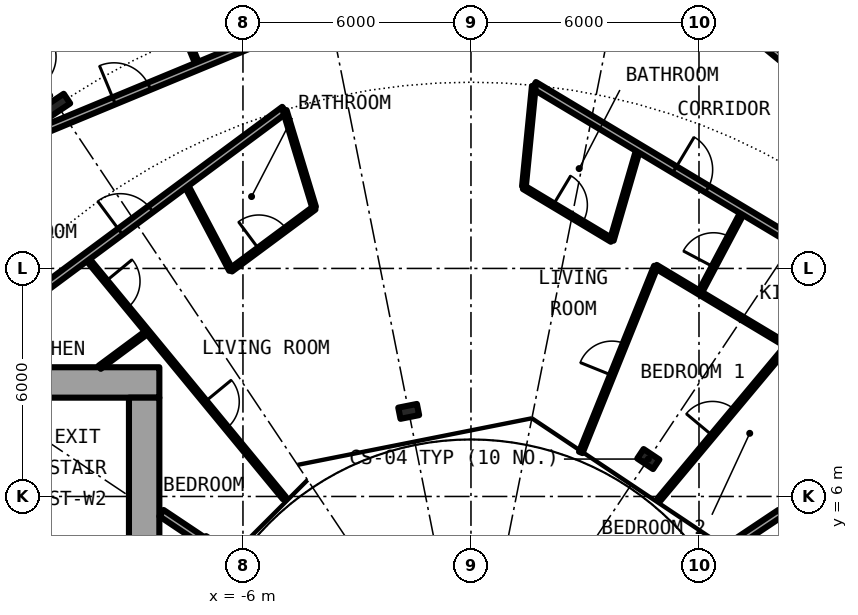
"""IFC4 building model, lengths in metres.
Left out: names, types, materials, properties, quantities, classifications, styles, units other than length and angle.
Written with IfcOpenShell. Run it as: python <this file> out.ifc"""

import sys

from ifc_helpers import new_model, si_unit, direction, frame, frame_2d, origin, origin_2d, place, context, subcontext, project, spatial, rectangle, i_section, extrude, element, fill, save


model = new_model("IFC4")
c1 = context("Model", 3, precision=1e-05, world=origin(), true_north=direction((0.0, 1.0)))
c2 = subcontext(c1, "Body", "Model", "MODEL_VIEW")
j1 = project(units=[si_unit("LENGTHUNIT", "METRE"), si_unit("PLANEANGLEUNIT", "RADIAN")], contexts=[c1])
p1 = place(None, origin())
s1 = spatial("IfcSite", under=j1, at=p1, CompositionType="ELEMENT")
p2 = place(p1, origin())
s2 = spatial("IfcBuilding", under=s1, at=p2, CompositionType="ELEMENT")
p3 = place(p2, frame((0.0, 0.0, 50.25)))
s3 = spatial("IfcBuildingStorey", under=s2, at=p3, CompositionType="ELEMENT", Elevation=50.25)
p4 = place(p3, frame((-10.889, 16.297, 0.0), z_axis=(0.0, 0.0, 1.0), x_axis=(-0.55557023302, 0.831469612303, 0.0)))
e1 = element("IfcColumn", 1, at=p4, inside=s3, PredefinedType="COLUMN", context=c2, shape_type="SweptSolid", body=[
    extrude(i_section(OverallWidth=0.305, OverallDepth=0.62, WebThickness=0.021, FlangeThickness=0.04, FilletRadius=0.027, at=origin_2d()), origin(), (0.0, 0.0, 1.0), 3.05),
])
for number, where, z_axis, x_axis in (
    (2, (4.667, 6.984, 0.0), (0.0, 0.0, 1.0), (0.556, 0.831, 0.0)),
    (3, (-1.639, 8.239, 0.0), (0.0, 0.0, 1.0), (-0.195, 0.981, 0.0)),
):
    element("IfcColumn", number, at=place(p3, frame(where, z_axis=z_axis, x_axis=x_axis)), inside=s3, PredefinedType="COLUMN", context=c2, shape_type="SweptSolid", body=[
        extrude(i_section(OverallWidth=0.3, OverallDepth=0.5, WebThickness=0.014, FlangeThickness=0.028, FilletRadius=0.027, at=origin_2d()), origin(), (0.0, 0.0, 1.0), 3.05),
    ])
p5 = place(p3, frame((-8.2, 9.0, 0.0), z_axis=(0.0, 0.0, 1.0), x_axis=(-1.0, 0.0, 0.0)))
e4 = element("IfcWall", 4, at=p5, inside=s3, PredefinedType="SHEAR", context=c2, shape_type="SweptSolid", body=[
    extrude(rectangle(XDim=14.2, YDim=0.8, at=frame_2d((7.1, 0.0))), origin(), (0.0, 0.0, 1.0), 3.05),
])
p6 = place(p5, frame((11.675, 0.0, 0.0)))
e5 = element("IfcOpeningElement", 5, at=p6, cuts=e4, PredefinedType="OPENING", context=c2, shape_type="SweptSolid", body=[
    extrude(rectangle(XDim=1.2, YDim=2.3, at=frame_2d((0.6, 1.15))), frame((0.0, 0.41, 0.0), z_axis=(0.0, -1.0, 0.0), x_axis=(1.0, 0.0, 0.0)), (0.0, 0.0, 1.0), 0.82),
])
p7 = place(p3, frame((-8.6, 8.6, 0.0), z_axis=(0.0, 0.0, 1.0), x_axis=(0.0, -1.0, 0.0)))
e6 = element("IfcWall", 6, at=p7, inside=s3, PredefinedType="SHEAR", context=c2, shape_type="SweptSolid", body=[
    extrude(rectangle(XDim=17.2, YDim=0.8, at=frame_2d((8.6, 0.0))), origin(), (0.0, 0.0, 1.0), 3.05),
])
p8 = place(p7, frame((7.4, 0.0, 0.1)))
e7 = element("IfcOpeningElement", 7, at=p8, cuts=e6, PredefinedType="OPENING", context=c2, shape_type="SweptSolid", body=[
    extrude(rectangle(XDim=2.4, YDim=2.2, at=frame_2d((1.2, 1.1))), frame((0.0, 0.41, 0.0), z_axis=(0.0, -1.0, 0.0), x_axis=(1.0, 0.0, 0.0)), (0.0, 0.0, 1.0), 0.82),
])
p9 = place(p3, frame((-10.398, 25.107, 0.0), z_axis=(0.0, 0.0, 1.0), x_axis=(0.382458509789, -0.923972666419, 0.0)))
e8 = element("IfcWall", 8, at=p9, inside=s3, PredefinedType="PARTITIONING", context=c2, shape_type="SweptSolid", body=[
    extrude(rectangle(XDim=8.419, YDim=0.1, at=frame_2d((4.209, 0.0))), origin(), (0.0, 0.0, 1.0), 2.7),
])
p10 = place(p9, frame((6.677, 0.0, 0.0)))
e9 = element("IfcOpeningElement", 9, at=p10, cuts=e8, PredefinedType="OPENING", context=c2, shape_type="SweptSolid", body=[
    extrude(rectangle(XDim=0.9, YDim=2.3, at=frame_2d((0.45, 1.15))), frame((0.0, 0.06, 0.0), z_axis=(0.0, -1.0, 0.0), x_axis=(1.0, 0.0, 0.0)), (0.0, 0.0, 1.0), 0.12),
])
p11 = place(p9, frame((2.468, 0.0, 0.0)))
e10 = element("IfcOpeningElement", 10, at=p11, cuts=e8, PredefinedType="OPENING", context=c2, shape_type="SweptSolid", body=[
    extrude(rectangle(XDim=0.9, YDim=2.3, at=frame_2d((0.45, 1.15))), frame((0.0, 0.06, 0.0), z_axis=(0.0, -1.0, 0.0), x_axis=(1.0, 0.0, 0.0)), (0.0, 0.0, 1.0), 0.12),
])
p12 = place(p3, frame((-10.132, 12.296, 0.0), z_axis=(0.0, 0.0, 1.0), x_axis=(0.635976043025, -0.771708800454, 0.0)))
e11 = element("IfcWall", 11, at=p12, inside=s3, PredefinedType="PARTITIONING", context=c2, shape_type="SweptSolid", body=[
    extrude(rectangle(XDim=8.213, YDim=0.1, at=frame_2d((4.106, 0.0))), origin(), (0.0, 0.0, 1.0), 2.7),
])
p13 = place(p12, frame((0.823, 0.0, 0.0)))
e12 = element("IfcOpeningElement", 12, at=p13, cuts=e11, PredefinedType="OPENING", context=c2, shape_type="SweptSolid", body=[
    extrude(rectangle(XDim=0.9, YDim=2.3, at=frame_2d((0.45, 1.15))), frame((0.0, 0.06, 0.0), z_axis=(0.0, -1.0, 0.0), x_axis=(1.0, 0.0, 0.0)), (0.0, 0.0, 1.0), 0.12),
])
p14 = place(p12, frame((4.929, 0.0, 0.0)))
e13 = element("IfcOpeningElement", 13, at=p14, cuts=e11, PredefinedType="OPENING", context=c2, shape_type="SweptSolid", body=[
    extrude(rectangle(XDim=0.9, YDim=2.3, at=frame_2d((0.45, 1.15))), frame((0.0, 0.06, 0.0), z_axis=(0.0, -1.0, 0.0), x_axis=(1.0, 0.0, 0.0)), (0.0, 0.0, 1.0), 0.12),
])
p15 = place(p3, frame((-7.519, 14.234, 0.0), z_axis=(0.0, 0.0, 1.0), x_axis=(0.467001992543, -0.884256263173, 0.0)))
e14 = element("IfcWall", 14, at=p15, inside=s3, PredefinedType="PARTITIONING", context=c2, shape_type="SweptSolid", body=[
    extrude(rectangle(XDim=2.572, YDim=0.1, at=frame_2d((1.286, 0.0))), origin(), (0.0, 0.0, 1.0), 2.7),
])
p16 = place(p3, frame((2.889, 7.159, 0.0), z_axis=(0.0, 0.0, 1.0), x_axis=(0.374372761824, 0.927278294367, 0.0)))
e15 = element("IfcWall", 15, at=p16, inside=s3, PredefinedType="PARTITIONING", context=c2, shape_type="SweptSolid", body=[
    extrude(rectangle(XDim=5.276, YDim=0.1, at=frame_2d((2.638, 0.0))), origin(), (0.0, 0.0, 1.0), 2.7),
])
p17 = place(p16, frame((2.188, 0.0, 0.0)))
e16 = element("IfcOpeningElement", 16, at=p17, cuts=e15, PredefinedType="OPENING", context=c2, shape_type="SweptSolid", body=[
    extrude(rectangle(XDim=0.9, YDim=2.3, at=frame_2d((0.45, 1.15))), frame((0.0, 0.06, 0.0), z_axis=(0.0, -1.0, 0.0), x_axis=(1.0, 0.0, 0.0)), (0.0, 0.0, 1.0), 0.12),
])
p18 = place(p3, frame((3.706, 12.744, 0.0), z_axis=(0.0, 0.0, 1.0), x_axis=(0.279201466266, 0.960232545395, 0.0)))
e17 = element("IfcWall", 17, at=p18, inside=s3, PredefinedType="PARTITIONING", context=c2, shape_type="SweptSolid", body=[
    extrude(rectangle(XDim=2.524, YDim=0.1, at=frame_2d((1.262, 0.0))), origin(), (0.0, 0.0, 1.0), 2.7),
])
p19 = place(p3, frame((4.952, 5.923, 0.0), z_axis=(0.0, 0.0, 1.0), x_axis=(0.641376424834, 0.767226356213, 0.0)))
e18 = element("IfcWall", 18, at=p19, inside=s3, PredefinedType="PARTITIONING", context=c2, shape_type="SweptSolid", body=[
    extrude(rectangle(XDim=5.275, YDim=0.1, at=frame_2d((2.637, 0.0))), origin(), (0.0, 0.0, 1.0), 2.7),
])
p20 = place(p19, frame((2.187, 0.0, 0.0)))
e19 = element("IfcOpeningElement", 19, at=p20, cuts=e18, PredefinedType="OPENING", context=c2, shape_type="SweptSolid", body=[
    extrude(rectangle(XDim=0.9, YDim=2.3, at=frame_2d((0.45, 1.15))), frame((0.0, 0.06, 0.0), z_axis=(0.0, -1.0, 0.0), x_axis=(1.0, 0.0, 0.0)), (0.0, 0.0, 1.0), 0.12),
])
p21 = place(p3, frame((6.021, 11.357, 0.0), z_axis=(0.0, 0.0, 1.0), x_axis=(0.468337293896, 0.883549760425, 0.0)))
e20 = element("IfcWall", 20, at=p21, inside=s3, PredefinedType="PARTITIONING", context=c2, shape_type="SweptSolid", body=[
    extrude(rectangle(XDim=2.445, YDim=0.1, at=frame_2d((1.222, 0.0))), origin(), (0.0, 0.0, 1.0), 2.7),
])
p22 = place(p21, frame((0.772, 0.0, 0.0)))
e21 = element("IfcOpeningElement", 21, at=p22, cuts=e20, PredefinedType="OPENING", context=c2, shape_type="SweptSolid", body=[
    extrude(rectangle(XDim=0.9, YDim=2.3, at=frame_2d((0.45, 1.15))), frame((0.0, 0.06, 0.0), z_axis=(0.0, -1.0, 0.0), x_axis=(1.0, 0.0, 0.0)), (0.0, 0.0, 1.0), 0.12),
])
for number, where, z_axis, x_axis in (
    (22, (-6.513, 4.472, 0.0), (0.0, 0.0, 1.0), (-0.831, 0.556, 0.0)),
    (23, (6.513, 4.472, 0.0), (0.0, 0.0, 1.0), (0.831, 0.556, 0.0)),
):
    element("IfcWall", number, at=place(p3, frame(where, z_axis=z_axis, x_axis=x_axis)), inside=s3, PredefinedType="PARTITIONING", context=c2, shape_type="SweptSolid", body=[
        extrude(rectangle(XDim=1.962, YDim=0.2, at=frame_2d((0.981, 0.0))), origin(), (0.0, 0.0, 1.0), 2.7),
    ])
p23 = place(p3, frame((1.392, 14.132, 0.0), z_axis=(0.0, 0.0, 1.0), x_axis=(0.857524856518, -0.514442533674, 0.0)))
e24 = element("IfcWall", 24, at=p23, inside=s3, PredefinedType="PARTITIONING", context=c2, shape_type="SweptSolid", body=[
    extrude(rectangle(XDim=2.698, YDim=0.1, at=frame_2d((1.349, 0.0))), origin(), (0.0, 0.0, 1.0), 2.7),
])
p24 = place(p23, frame((0.899, 0.0, 0.0)))
e25 = element("IfcOpeningElement", 25, at=p24, cuts=e24, PredefinedType="OPENING", context=c2, shape_type="SweptSolid", body=[
    extrude(rectangle(XDim=0.9, YDim=2.3, at=frame_2d((0.45, 1.15))), frame((0.0, 0.06, 0.0), z_axis=(0.0, -1.0, 0.0), x_axis=(1.0, 0.0, 0.0)), (0.0, 0.0, 1.0), 0.12),
])
p25 = place(p3, frame((4.863, 12.05, 0.0), z_axis=(0.0, 0.0, 1.0), x_axis=(0.857576410704, -0.51435658818, 0.0)))
e26 = element("IfcWall", 26, at=p25, inside=s3, PredefinedType="PARTITIONING", context=c2, shape_type="SweptSolid", body=[
    extrude(rectangle(XDim=5.16, YDim=0.1, at=frame_2d((2.58, 0.0))), origin(), (0.0, 0.0, 1.0), 2.7),
])
p26 = place(p3, frame((-9.772, 9.398, 0.0), z_axis=(0.0, 0.0, 1.0), x_axis=(0.803264156882, 0.595622946392, 0.0)))
e27 = element("IfcWall", 27, at=p26, inside=s3, PredefinedType="PARTITIONING", context=c2, shape_type="SweptSolid", body=[
    extrude(rectangle(XDim=1.565, YDim=0.1, at=frame_2d((0.782, 0.0))), origin(), (0.0, 0.0, 1.0), 2.7),
])
p27 = place(p3, frame((-6.318, 11.96, 0.0), z_axis=(0.0, 0.0, 1.0), x_axis=(0.803128348509, 0.595806055542, 0.0)))
e28 = element("IfcWall", 28, at=p27, inside=s3, PredefinedType="PARTITIONING", context=c2, shape_type="SweptSolid", body=[
    extrude(rectangle(XDim=2.734, YDim=0.1, at=frame_2d((1.367, 0.0))), origin(), (0.0, 0.0, 1.0), 2.7),
])
p28 = place(p27, frame((0.917, 0.0, 0.0)))
e29 = element("IfcOpeningElement", 29, at=p28, cuts=e28, PredefinedType="OPENING", context=c2, shape_type="SweptSolid", body=[
    extrude(rectangle(XDim=0.9, YDim=2.3, at=frame_2d((0.45, 1.15))), frame((0.0, 0.06, 0.0), z_axis=(0.0, -1.0, 0.0), x_axis=(1.0, 0.0, 0.0)), (0.0, 0.0, 1.0), 0.12),
])
p29 = place(p3, frame((1.658, 16.819, 0.0), z_axis=(0.0, 0.0, 1.0), x_axis=(0.857688434449, -0.514169767113, 0.0)))
e30 = element("IfcWall", 30, at=p29, inside=s3, PredefinedType="PARTITIONING", context=c2, shape_type="SweptSolid", body=[
    extrude(rectangle(XDim=14.429, YDim=0.2, at=frame_2d((7.215, 0.0))), origin(), (0.0, 0.0, 1.0), 2.7),
])
p30 = place(p29, frame((4.316, 0.0, 0.0)))
e31 = element("IfcOpeningElement", 31, at=p30, cuts=e30, PredefinedType="OPENING", context=c2, shape_type="SweptSolid", body=[
    extrude(rectangle(XDim=1.0, YDim=2.3, at=frame_2d((0.5, 1.15))), frame((0.0, 0.11, 0.0), z_axis=(0.0, -1.0, 0.0), x_axis=(1.0, 0.0, 0.0)), (0.0, 0.0, 1.0), 0.22),
])
p31 = place(p3, frame((-14.037, 9.4, 0.0), z_axis=(0.0, 0.0, 1.0), x_axis=(0.803202106898, 0.595706618626, 0.0)))
e32 = element("IfcWall", 32, at=p31, inside=s3, PredefinedType="PARTITIONING", context=c2, shape_type="SweptSolid", body=[
    extrude(rectangle(XDim=11.368, YDim=0.2, at=frame_2d((5.684, 0.0))), origin(), (0.0, 0.0, 1.0), 2.7),
])
p32 = place(p31, frame((5.988, 0.0, 0.0)))
e33 = element("IfcOpeningElement", 33, at=p32, cuts=e32, PredefinedType="OPENING", context=c2, shape_type="SweptSolid", body=[
    extrude(rectangle(XDim=1.0, YDim=2.3, at=frame_2d((0.5, 1.15))), frame((0.0, 0.11, 0.0), z_axis=(0.0, -1.0, 0.0), x_axis=(1.0, 0.0, 0.0)), (0.0, 0.0, 1.0), 0.22),
])
p33 = place(p3, frame((-12.435, 15.15, 0.0), z_axis=(0.0, 0.0, 1.0), x_axis=(0.923845560554, 0.38276543763, 0.0)))
e34 = element("IfcWall", 34, at=p33, inside=s3, PredefinedType="PARTITIONING", context=c2, shape_type="SweptSolid", body=[
    extrude(rectangle(XDim=11.381, YDim=0.2, at=frame_2d((5.69, 0.0))), origin(), (0.0, 0.0, 1.0), 2.7),
])
p34 = place(p33, frame((3.293, 0.0, 0.0)))
e35 = element("IfcOpeningElement", 35, at=p34, cuts=e34, PredefinedType="OPENING", context=c2, shape_type="SweptSolid", body=[
    extrude(rectangle(XDim=1.0, YDim=2.3, at=frame_2d((0.5, 1.15))), frame((0.0, 0.11, 0.0), z_axis=(0.0, -1.0, 0.0), x_axis=(1.0, 0.0, 0.0)), (0.0, 0.0, 1.0), 0.22),
])
p35 = place(p3, frame((7.5, 18.108, 0.0), z_axis=(0.0, 0.0, 1.0), x_axis=(0.773041360816, -0.634355621452, 0.0)))
e36 = element("IfcWall", 36, at=p35, inside=s3, PredefinedType="PARTITIONING", context=c2, shape_type="SweptSolid", body=[
    extrude(rectangle(XDim=11.221, YDim=0.2, at=frame_2d((5.61, 0.0))), origin(), (0.0, 0.0, 1.0), 2.38),
])
p36 = place(p35, frame((7.083, 0.0, 0.0)))
e37 = element("IfcOpeningElement", 37, at=p36, cuts=e36, PredefinedType="OPENING", context=c2, shape_type="SweptSolid", body=[
    extrude(rectangle(XDim=1.0, YDim=2.3, at=frame_2d((0.5, 1.15))), frame((0.0, 0.11, 0.0), z_axis=(0.0, -1.0, 0.0), x_axis=(1.0, 0.0, 0.0)), (0.0, 0.0, 1.0), 0.22),
])
p37 = place(p3, frame((1.394, 14.154, 0.0), z_axis=(0.0, 0.0, 1.0), x_axis=(0.097901702875, 0.995196089509, 0.0)))
e38 = element("IfcWall", 38, at=p37, inside=s3, PredefinedType="PARTITIONING", context=c2, shape_type="SweptSolid", body=[
    extrude(rectangle(XDim=2.656, YDim=0.1, at=frame_2d((1.328, 0.0))), origin(), (0.0, 0.0, 1.0), 2.7),
])
p38 = place(p3, frame((-4.9, 16.152, 0.0), z_axis=(0.0, 0.0, 1.0), x_axis=(0.290456070925, -0.956888327269, 0.0)))
e39 = element("IfcWall", 39, at=p38, inside=s3, PredefinedType="PARTITIONING", context=c2, shape_type="SweptSolid", body=[
    extrude(rectangle(XDim=2.658, YDim=0.1, at=frame_2d((1.329, 0.0))), origin(), (0.0, 0.0, 1.0), 2.7),
])
p39 = place(p34, origin())
e40 = element("IfcDoor", 40, at=p39, inside=s3, OperationType="SINGLE_SWING_LEFT", PredefinedType="DOOR", context=c2, shape_type="SweptSolid", body=[
    extrude(rectangle(XDim=1.0, YDim=2.3, at=frame_2d((0.5, 1.15))), frame((0.0, 0.025, 0.0), z_axis=(0.0, -1.0, 0.0), x_axis=(1.0, 0.0, 0.0)), (0.0, 0.0, 1.0), 0.05),
])
fill(e35, e40)
p40 = place(p30, origin())
e41 = element("IfcDoor", 41, at=p40, inside=s3, OperationType="SINGLE_SWING_LEFT", PredefinedType="DOOR", context=c2, shape_type="SweptSolid", body=[
    extrude(rectangle(XDim=1.0, YDim=2.3, at=frame_2d((0.5, 1.15))), frame((0.0, 0.025, 0.0), z_axis=(0.0, -1.0, 0.0), x_axis=(1.0, 0.0, 0.0)), (0.0, 0.0, 1.0), 0.05),
])
fill(e31, e41)
p41 = place(p24, origin())
e42 = element("IfcDoor", 42, at=p41, inside=s3, OperationType="SINGLE_SWING_RIGHT", PredefinedType="DOOR", context=c2, shape_type="SweptSolid", body=[
    extrude(rectangle(XDim=0.9, YDim=2.3, at=frame_2d((0.45, 1.15))), frame((0.0, 0.025, 0.0), z_axis=(0.0, -1.0, 0.0), x_axis=(1.0, 0.0, 0.0)), (0.0, 0.0, 1.0), 0.05),
])
fill(e25, e42)
p42 = place(p22, origin())
e43 = element("IfcDoor", 43, at=p42, inside=s3, OperationType="SINGLE_SWING_RIGHT", PredefinedType="DOOR", context=c2, shape_type="SweptSolid", body=[
    extrude(rectangle(XDim=0.9, YDim=2.3, at=frame_2d((0.45, 1.15))), frame((0.0, 0.025, 0.0), z_axis=(0.0, -1.0, 0.0), x_axis=(1.0, 0.0, 0.0)), (0.0, 0.0, 1.0), 0.05),
])
fill(e21, e43)
p43 = place(p17, origin())
e44 = element("IfcDoor", 44, at=p43, inside=s3, OperationType="SINGLE_SWING_RIGHT", PredefinedType="DOOR", context=c2, shape_type="SweptSolid", body=[
    extrude(rectangle(XDim=0.9, YDim=2.3, at=frame_2d((0.45, 1.15))), frame((0.0, 0.025, 0.0), z_axis=(0.0, -1.0, 0.0), x_axis=(1.0, 0.0, 0.0)), (0.0, 0.0, 1.0), 0.05),
])
fill(e16, e44)
p44 = place(p20, origin())
e45 = element("IfcDoor", 45, at=p44, inside=s3, OperationType="SINGLE_SWING_RIGHT", PredefinedType="DOOR", context=c2, shape_type="SweptSolid", body=[
    extrude(rectangle(XDim=0.9, YDim=2.3, at=frame_2d((0.45, 1.15))), frame((0.0, 0.025, 0.0), z_axis=(0.0, -1.0, 0.0), x_axis=(1.0, 0.0, 0.0)), (0.0, 0.0, 1.0), 0.05),
])
fill(e19, e45)
p45 = place(p32, origin())
e46 = element("IfcDoor", 46, at=p45, inside=s3, OperationType="SINGLE_SWING_RIGHT", PredefinedType="DOOR", context=c2, shape_type="SweptSolid", body=[
    extrude(rectangle(XDim=1.0, YDim=2.3, at=frame_2d((0.5, 1.15))), frame((0.0, 0.025, 0.0), z_axis=(0.0, -1.0, 0.0), x_axis=(1.0, 0.0, 0.0)), (0.0, 0.0, 1.0), 0.05),
])
fill(e33, e46)
p46 = place(p28, origin())
e47 = element("IfcDoor", 47, at=p46, inside=s3, OperationType="SINGLE_SWING_RIGHT", PredefinedType="DOOR", context=c2, shape_type="SweptSolid", body=[
    extrude(rectangle(XDim=0.9, YDim=2.3, at=frame_2d((0.45, 1.15))), frame((0.0, 0.025, 0.0), z_axis=(0.0, -1.0, 0.0), x_axis=(1.0, 0.0, 0.0)), (0.0, 0.0, 1.0), 0.05),
])
fill(e29, e47)
p47 = place(p13, origin())
e48 = element("IfcDoor", 48, at=p47, inside=s3, OperationType="SINGLE_SWING_LEFT", PredefinedType="DOOR", context=c2, shape_type="SweptSolid", body=[
    extrude(rectangle(XDim=0.9, YDim=2.3, at=frame_2d((0.45, 1.15))), frame((0.0, 0.025, 0.0), z_axis=(0.0, -1.0, 0.0), x_axis=(1.0, 0.0, 0.0)), (0.0, 0.0, 1.0), 0.05),
])
fill(e12, e48)
p48 = place(p14, origin())
e49 = element("IfcDoor", 49, at=p48, inside=s3, OperationType="SINGLE_SWING_RIGHT", PredefinedType="DOOR", context=c2, shape_type="SweptSolid", body=[
    extrude(rectangle(XDim=0.9, YDim=2.3, at=frame_2d((0.45, 1.15))), frame((0.0, 0.025, 0.0), z_axis=(0.0, -1.0, 0.0), x_axis=(1.0, 0.0, 0.0)), (0.0, 0.0, 1.0), 0.05),
])
fill(e13, e49)
save(model, sys.argv[1])
